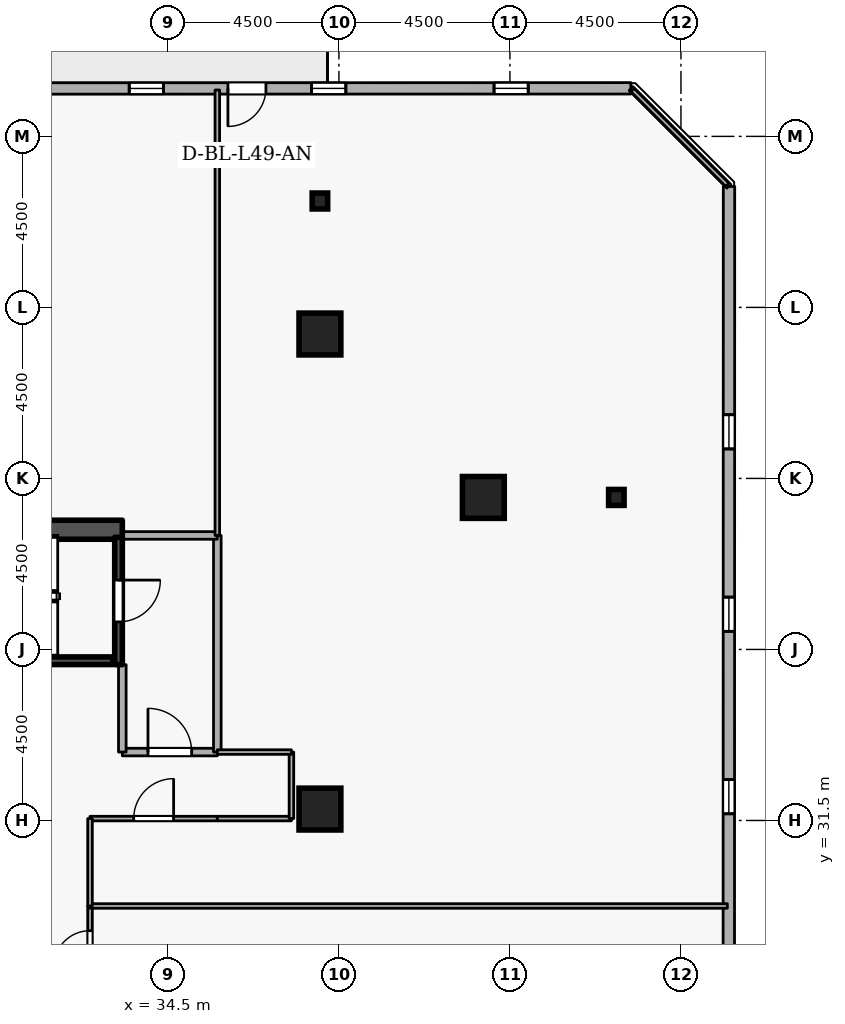
"""IFC4 building model, lengths in metres.
Left out: names, types, materials, properties, quantities, classifications, styles, units other than length and angle.
Written with IfcOpenShell. Run it as: python <this file> out.ifc"""

import sys

from ifc_helpers import new_model, si_unit, direction, frame, frame_2d, origin, origin_2d, place, context, subcontext, project, spatial, rectangle, i_section, extrude, element, fill, save


model = new_model("IFC4")
c1 = context("Model", 3, precision=1e-05, world=origin(), true_north=direction((0.0, 1.0)))
c2 = subcontext(c1, "Body", "Model", "MODEL_VIEW")
j1 = project(units=[si_unit("LENGTHUNIT", "METRE"), si_unit("PLANEANGLEUNIT", "RADIAN")], contexts=[c1])
p1 = place(None, origin())
s1 = spatial("IfcSite", under=j1, at=p1, CompositionType="ELEMENT")
p2 = place(p1, origin())
s2 = spatial("IfcBuilding", under=s1, at=p2, CompositionType="ELEMENT")
p3 = place(p2, frame((0.0, 0.0, 185.7)))
s3 = spatial("IfcBuildingStorey", under=s2, at=p3, CompositionType="ELEMENT", Elevation=185.7)
p4 = place(p3, frame((17.7, 39.15, 0.0), z_axis=(0.0, 0.0, 1.0), x_axis=(1.0, 0.0, 0.0)))
e1 = element("IfcWall", 1, at=p4, inside=s3, PredefinedType="SHEAR", context=c2, shape_type="SweptSolid", body=[
    extrude(rectangle(XDim=15.6, YDim=0.5, at=frame_2d((7.8, 0.0))), origin(), (0.0, 0.0, 1.0), 3.6),
])
for number, where, z_axis, x_axis in (
    (2, (42.8, 40.0, 0.0), (0.0, 0.0, 1.0), (1.0, 0.0, 0.0)),
    (3, (38.5, 44.3, 0.0), (0.0, 0.0, 1.0), (1.0, 0.0, 0.0)),
    (4, (38.5, 31.8, 0.0), (0.0, 0.0, 1.0), (1.0, 0.0, 0.0)),
):
    element("IfcColumn", number, at=place(p3, frame(where, z_axis=z_axis, x_axis=x_axis)), inside=s3, PredefinedType="COLUMN", context=c2, shape_type="SweptSolid", body=[
        extrude(rectangle(XDim=1.1, YDim=1.1, at=origin_2d()), origin(), (0.0, 0.0, 1.0), 3.6),
    ])
for number, where, z_axis, x_axis in (
    (5, (46.3, 40.0, 0.0), (0.0, 0.0, 1.0), (1.0, 0.0, 0.0)),
    (6, (38.5, 47.8, 0.0), (0.0, 0.0, 1.0), (1.0, 0.0, 0.0)),
):
    element("IfcColumn", number, at=place(p3, frame(where, z_axis=z_axis, x_axis=x_axis)), inside=s3, PredefinedType="COLUMN", context=c2, shape_type="SweptSolid", body=[
        extrude(i_section(OverallWidth=0.407, OverallDepth=0.419, WebThickness=0.031, FlangeThickness=0.049, FilletRadius=0.015, at=origin_2d()), origin(), (0.0, 0.0, 1.0), 3.6),
    ])
p5 = place(p3, frame((49.256, 14.576, 0.0), z_axis=(0.0, 0.0, 1.0), x_axis=(0.000268805477, 0.999999963872, 0.0)))
e7 = element("IfcWall", 7, at=p5, inside=s3, PredefinedType="STANDARD", context=c2, shape_type="SweptSolid", body=[
    extrude(rectangle(XDim=33.605, YDim=0.3, at=frame_2d((16.802, 0.0))), origin(), (0.0, 0.0, 1.0), 2.7),
])
p6 = place(p5, frame((2.7, 0.0, 0.72)))
e8 = element("IfcOpeningElement", 8, at=p6, cuts=e7, PredefinedType="OPENING", context=c2, shape_type="SweptSolid", body=[
    extrude(rectangle(XDim=0.9, YDim=1.75, at=frame_2d((0.45, 0.875))), frame((0.0, 0.16, 0.0), z_axis=(0.0, -1.0, 0.0), x_axis=(1.0, 0.0, 0.0)), (0.0, 0.0, 1.0), 0.32),
])
p7 = place(p5, frame((7.5, 0.0, 0.72)))
e9 = element("IfcOpeningElement", 9, at=p7, cuts=e7, PredefinedType="OPENING", context=c2, shape_type="SweptSolid", body=[
    extrude(rectangle(XDim=0.9, YDim=1.75, at=frame_2d((0.45, 0.875))), frame((0.0, 0.16, 0.0), z_axis=(0.0, -1.0, 0.0), x_axis=(1.0, 0.0, 0.0)), (0.0, 0.0, 1.0), 0.32),
])
p8 = place(p5, frame((17.1, 0.0, 0.72)))
e10 = element("IfcOpeningElement", 10, at=p8, cuts=e7, PredefinedType="OPENING", context=c2, shape_type="SweptSolid", body=[
    extrude(rectangle(XDim=0.9, YDim=1.75, at=frame_2d((0.45, 0.875))), frame((0.0, 0.16, 0.0), z_axis=(0.0, -1.0, 0.0), x_axis=(1.0, 0.0, 0.0)), (0.0, 0.0, 1.0), 0.32),
])
p9 = place(p5, frame((21.9, 0.0, 0.72)))
e11 = element("IfcOpeningElement", 11, at=p9, cuts=e7, PredefinedType="OPENING", context=c2, shape_type="SweptSolid", body=[
    extrude(rectangle(XDim=0.9, YDim=1.75, at=frame_2d((0.45, 0.875))), frame((0.0, 0.16, 0.0), z_axis=(0.0, -1.0, 0.0), x_axis=(1.0, 0.0, 0.0)), (0.0, 0.0, 1.0), 0.32),
])
p10 = place(p5, frame((26.7, 0.0, 0.72)))
e12 = element("IfcOpeningElement", 12, at=p10, cuts=e7, PredefinedType="OPENING", context=c2, shape_type="SweptSolid", body=[
    extrude(rectangle(XDim=0.9, YDim=1.75, at=frame_2d((0.45, 0.875))), frame((0.0, 0.16, 0.0), z_axis=(0.0, -1.0, 0.0), x_axis=(1.0, 0.0, 0.0)), (0.0, 0.0, 1.0), 0.32),
])
p11 = place(p3, frame((46.681, 50.765, 0.0), z_axis=(0.0, 0.0, 1.0), x_axis=(-0.999999963872, -0.000268805477, 0.0)))
e13 = element("IfcWall", 13, at=p11, inside=s3, PredefinedType="STANDARD", context=c2, shape_type="SweptSolid", body=[
    extrude(rectangle(XDim=33.605, YDim=0.3, at=frame_2d((16.802, 0.0))), origin(), (0.0, 0.0, 1.0), 2.7),
])
p12 = place(p11, frame((9.603, 0.0, 0.0)))
e14 = element("IfcOpeningElement", 14, at=p12, cuts=e13, PredefinedType="OPENING", context=c2, shape_type="SweptSolid", body=[
    extrude(rectangle(XDim=1.0, YDim=2.08, at=frame_2d((0.5, 1.04))), frame((0.0, 0.16, 0.0), z_axis=(0.0, -1.0, 0.0), x_axis=(1.0, 0.0, 0.0)), (0.0, 0.0, 1.0), 0.32),
])
p13 = place(p11, frame((2.7, 0.0, 0.72)))
e15 = element("IfcOpeningElement", 15, at=p13, cuts=e13, PredefinedType="OPENING", context=c2, shape_type="SweptSolid", body=[
    extrude(rectangle(XDim=0.9, YDim=1.75, at=frame_2d((0.45, 0.875))), frame((0.0, 0.16, 0.0), z_axis=(0.0, -1.0, 0.0), x_axis=(1.0, 0.0, 0.0)), (0.0, 0.0, 1.0), 0.32),
])
p14 = place(p11, frame((7.5, 0.0, 0.72)))
e16 = element("IfcOpeningElement", 16, at=p14, cuts=e13, PredefinedType="OPENING", context=c2, shape_type="SweptSolid", body=[
    extrude(rectangle(XDim=0.9, YDim=1.75, at=frame_2d((0.45, 0.875))), frame((0.0, 0.16, 0.0), z_axis=(0.0, -1.0, 0.0), x_axis=(1.0, 0.0, 0.0)), (0.0, 0.0, 1.0), 0.32),
])
p15 = place(p11, frame((12.3, 0.0, 0.72)))
e17 = element("IfcOpeningElement", 17, at=p15, cuts=e13, PredefinedType="OPENING", context=c2, shape_type="SweptSolid", body=[
    extrude(rectangle(XDim=0.9, YDim=1.75, at=frame_2d((0.45, 0.875))), frame((0.0, 0.16, 0.0), z_axis=(0.0, -1.0, 0.0), x_axis=(1.0, 0.0, 0.0)), (0.0, 0.0, 1.0), 0.32),
])
p16 = place(p11, frame((17.1, 0.0, 0.72)))
e18 = element("IfcOpeningElement", 18, at=p16, cuts=e13, PredefinedType="OPENING", context=c2, shape_type="SweptSolid", body=[
    extrude(rectangle(XDim=0.9, YDim=1.75, at=frame_2d((0.45, 0.875))), frame((0.0, 0.16, 0.0), z_axis=(0.0, -1.0, 0.0), x_axis=(1.0, 0.0, 0.0)), (0.0, 0.0, 1.0), 0.32),
])
p17 = place(p11, frame((21.9, 0.0, 0.72)))
e19 = element("IfcOpeningElement", 19, at=p17, cuts=e13, PredefinedType="OPENING", context=c2, shape_type="SweptSolid", body=[
    extrude(rectangle(XDim=0.9, YDim=1.75, at=frame_2d((0.45, 0.875))), frame((0.0, 0.16, 0.0), z_axis=(0.0, -1.0, 0.0), x_axis=(1.0, 0.0, 0.0)), (0.0, 0.0, 1.0), 0.32),
])
p18 = place(p11, frame((26.7, 0.0, 0.72)))
e20 = element("IfcOpeningElement", 20, at=p18, cuts=e13, PredefinedType="OPENING", context=c2, shape_type="SweptSolid", body=[
    extrude(rectangle(XDim=0.9, YDim=1.75, at=frame_2d((0.45, 0.875))), frame((0.0, 0.16, 0.0), z_axis=(0.0, -1.0, 0.0), x_axis=(1.0, 0.0, 0.0)), (0.0, 0.0, 1.0), 0.32),
])
p19 = place(p3, frame((33.2, 38.95, 0.0), z_axis=(0.0, 0.0, 1.0), x_axis=(0.0, -1.0, 0.0)))
e21 = element("IfcWall", 21, at=p19, inside=s3, PredefinedType="SHEAR", context=c2, shape_type="SweptSolid", body=[
    extrude(rectangle(XDim=3.35, YDim=0.2, at=frame_2d((1.675, 0.0))), origin(), (0.0, 0.0, 1.0), 3.6),
])
p20 = place(p19, frame((1.125, 0.0, 0.0)))
e22 = element("IfcOpeningElement", 22, at=p20, cuts=e21, PredefinedType="OPENING", context=c2, shape_type="SweptSolid", body=[
    extrude(rectangle(XDim=1.1, YDim=2.1, at=frame_2d((0.55, 1.05))), frame((0.0, 0.11, 0.0), z_axis=(0.0, -1.0, 0.0), x_axis=(1.0, 0.0, 0.0)), (0.0, 0.0, 1.0), 0.22),
])
p21 = place(p3, frame((25.95, 35.703, 0.0), z_axis=(0.0, 0.0, 1.0), x_axis=(1.0, 0.0, 0.0)))
e23 = element("IfcWall", 23, at=p21, inside=s3, PredefinedType="SHEAR", context=c2, shape_type="SweptSolid", body=[
    extrude(rectangle(XDim=7.1, YDim=0.2, at=frame_2d((3.55, 0.0))), origin(), (0.0, 0.0, 1.0), 3.6),
])
p22 = place(p3, frame((33.3, 33.3, 0.0), z_axis=(0.0, 0.0, 1.0), x_axis=(1.0, 0.0, 0.0)))
e24 = element("IfcWall", 24, at=p22, inside=s3, PredefinedType="STANDARD", context=c2, shape_type="SweptSolid", body=[
    extrude(rectangle(XDim=2.5, YDim=0.2, at=frame_2d((1.25, 0.0))), origin(), (0.0, 0.0, 1.0), 3.34),
])
p23 = place(p22, frame((0.675, 0.0, 0.0)))
e25 = element("IfcOpeningElement", 25, at=p23, cuts=e24, PredefinedType="OPENING", context=c2, shape_type="SweptSolid", body=[
    extrude(rectangle(XDim=1.15, YDim=2.1, at=frame_2d((0.575, 1.05))), frame((0.0, 0.11, 0.0), z_axis=(0.0, -1.0, 0.0), x_axis=(1.0, 0.0, 0.0)), (0.0, 0.0, 1.0), 0.22),
])
p24 = place(p3, frame((35.8, 33.3, 0.0), z_axis=(0.0, 0.0, 1.0), x_axis=(0.0, 1.0, 0.0)))
e26 = element("IfcWall", 26, at=p24, inside=s3, PredefinedType="STANDARD", context=c2, shape_type="SweptSolid", body=[
    extrude(rectangle(XDim=5.7, YDim=0.2, at=frame_2d((2.85, 0.0))), origin(), (0.0, 0.0, 1.0), 3.34),
])
p25 = place(p3, frame((35.8, 39.0, 0.0), z_axis=(0.0, 0.0, 1.0), x_axis=(-1.0, 0.0, 0.0)))
e27 = element("IfcWall", 27, at=p25, inside=s3, PredefinedType="STANDARD", context=c2, shape_type="SweptSolid", body=[
    extrude(rectangle(XDim=2.5, YDim=0.2, at=frame_2d((1.25, 0.0))), origin(), (0.0, 0.0, 1.0), 3.34),
])
p26 = place(p3, frame((33.3, 35.6, 0.0), z_axis=(0.0, 0.0, 1.0), x_axis=(0.0, -1.0, 0.0)))
e28 = element("IfcWall", 28, at=p26, inside=s3, PredefinedType="STANDARD", context=c2, shape_type="SweptSolid", body=[
    extrude(rectangle(XDim=2.3, YDim=0.2, at=frame_2d((1.15, 0.0))), origin(), (0.0, 0.0, 1.0), 2.545),
])
p27 = place(p3, frame((32.45, 27.0, 0.0), z_axis=(0.0, 0.0, 1.0), x_axis=(0.0, 1.0, 0.0)))
e29 = element("IfcWall", 29, at=p27, inside=s3, PredefinedType="PARTITIONING", context=c2, shape_type="SweptSolid", body=[
    extrude(rectangle(XDim=2.25, YDim=0.12, at=frame_2d((1.125, 0.0))), origin(), (0.0, 0.0, 1.0), 3.34),
])
p28 = place(p27, frame((0.65, 0.0, 0.0)))
e30 = element("IfcOpeningElement", 30, at=p28, cuts=e29, PredefinedType="OPENING", context=c2, shape_type="SweptSolid", body=[
    extrude(rectangle(XDim=0.95, YDim=2.1, at=frame_2d((0.475, 1.05))), frame((0.0, 0.07, 0.0), z_axis=(0.0, -1.0, 0.0), x_axis=(1.0, 0.0, 0.0)), (0.0, 0.0, 1.0), 0.14),
])
p29 = place(p3, frame((32.45, 29.25, 0.0), z_axis=(0.0, 0.0, 1.0), x_axis=(1.0, 0.0, 0.0)))
e31 = element("IfcWall", 31, at=p29, inside=s3, PredefinedType="PARTITIONING", context=c2, shape_type="SweptSolid", body=[
    extrude(rectangle(XDim=16.77, YDim=0.12, at=frame_2d((8.385, 0.0))), origin(), (0.0, 0.0, 1.0), 3.34),
])
p30 = place(p3, frame((32.45, 31.55, 0.0), z_axis=(0.0, 0.0, 1.0), x_axis=(1.0, 0.0, 0.0)))
e32 = element("IfcWall", 32, at=p30, inside=s3, PredefinedType="PARTITIONING", context=c2, shape_type="SweptSolid", body=[
    extrude(rectangle(XDim=3.35, YDim=0.12, at=frame_2d((1.675, 0.0))), origin(), (0.0, 0.0, 1.0), 3.34),
])
p31 = place(p30, frame((1.15, 0.0, 0.0)))
e33 = element("IfcOpeningElement", 33, at=p31, cuts=e32, PredefinedType="OPENING", context=c2, shape_type="SweptSolid", body=[
    extrude(rectangle(XDim=1.05, YDim=2.1, at=frame_2d((0.525, 1.05))), frame((0.0, 0.07, 0.0), z_axis=(0.0, -1.0, 0.0), x_axis=(1.0, 0.0, 0.0)), (0.0, 0.0, 1.0), 0.14),
])
p32 = place(p3, frame((35.8, 31.55, 0.0), z_axis=(0.0, 0.0, 1.0), x_axis=(1.0, 0.0, 0.0)))
e34 = element("IfcWall", 34, at=p32, inside=s3, PredefinedType="PARTITIONING", context=c2, shape_type="SweptSolid", body=[
    extrude(rectangle(XDim=1.95, YDim=0.12, at=frame_2d((0.975, 0.0))), origin(), (0.0, 0.0, 1.0), 3.34),
])
p33 = place(p3, frame((37.75, 31.55, 0.0), z_axis=(0.0, 0.0, 1.0), x_axis=(0.0, 1.0, 0.0)))
e35 = element("IfcWall", 35, at=p33, inside=s3, PredefinedType="PARTITIONING", context=c2, shape_type="SweptSolid", body=[
    extrude(rectangle(XDim=1.75, YDim=0.12, at=frame_2d((0.875, 0.0))), origin(), (0.0, 0.0, 1.0), 3.34),
])
p34 = place(p3, frame((37.75, 33.3, 0.0), z_axis=(0.0, 0.0, 1.0), x_axis=(-1.0, 0.0, 0.0)))
e36 = element("IfcWall", 36, at=p34, inside=s3, PredefinedType="PARTITIONING", context=c2, shape_type="SweptSolid", body=[
    extrude(rectangle(XDim=1.95, YDim=0.12, at=frame_2d((0.975, 0.0))), origin(), (0.0, 0.0, 1.0), 3.34),
])
p35 = place(p3, frame((35.8, 39.0, 0.0), z_axis=(0.0, 0.0, 1.0), x_axis=(0.0, 1.0, 0.0)))
e37 = element("IfcWall", 37, at=p35, inside=s3, PredefinedType="PARTITIONING", context=c2, shape_type="SweptSolid", body=[
    extrude(rectangle(XDim=11.72, YDim=0.12, at=frame_2d((5.86, 0.0))), origin(), (0.0, 0.0, 1.0), 3.34),
])
p36 = place(p3, frame((46.725, 50.72, 0.0), z_axis=(0.0, 0.0, 1.0), x_axis=(0.707106781187, -0.707106781187, 0.0)))
e38 = element("IfcWall", 38, at=p36, inside=s3, PredefinedType="PARTITIONING", context=c2, shape_type="SweptSolid", body=[
    extrude(rectangle(XDim=3.528, YDim=0.12, at=frame_2d((1.764, 0.0))), origin(), (0.0, 0.0, 1.0), 3.34),
])
p37 = place(p3, frame((32.45, 29.25, 0.0), z_axis=(0.0, 0.0, 1.0), x_axis=(0.0, 1.0, 0.0)))
e39 = element("IfcWall", 39, at=p37, inside=s3, PredefinedType="PARTITIONING", context=c2, shape_type="SweptSolid", body=[
    extrude(rectangle(XDim=2.3, YDim=0.12, at=frame_2d((1.15, 0.0))), origin(), (0.0, 0.0, 1.0), 3.34),
])
p38 = place(p8, origin())
e40 = element("IfcWindow", 40, at=p38, inside=s3, PartitioningType="SINGLE_PANEL", PredefinedType="WINDOW", context=c2, shape_type="SweptSolid", body=[
    extrude(rectangle(XDim=0.9, YDim=1.75, at=frame_2d((0.45, 0.875))), frame((0.0, 0.03, 0.0), z_axis=(0.0, -1.0, 0.0), x_axis=(1.0, 0.0, 0.0)), (0.0, 0.0, 1.0), 0.06),
])
fill(e10, e40)
p39 = place(p9, origin())
e41 = element("IfcWindow", 41, at=p39, inside=s3, PartitioningType="SINGLE_PANEL", PredefinedType="WINDOW", context=c2, shape_type="SweptSolid", body=[
    extrude(rectangle(XDim=0.9, YDim=1.75, at=frame_2d((0.45, 0.875))), frame((0.0, 0.03, 0.0), z_axis=(0.0, -1.0, 0.0), x_axis=(1.0, 0.0, 0.0)), (0.0, 0.0, 1.0), 0.06),
])
fill(e11, e41)
p40 = place(p10, origin())
e42 = element("IfcWindow", 42, at=p40, inside=s3, PartitioningType="SINGLE_PANEL", PredefinedType="WINDOW", context=c2, shape_type="SweptSolid", body=[
    extrude(rectangle(XDim=0.9, YDim=1.75, at=frame_2d((0.45, 0.875))), frame((0.0, 0.03, 0.0), z_axis=(0.0, -1.0, 0.0), x_axis=(1.0, 0.0, 0.0)), (0.0, 0.0, 1.0), 0.06),
])
fill(e12, e42)
p41 = place(p12, origin())
e43 = element("IfcDoor", 43, at=p41, inside=s3, OperationType="SINGLE_SWING_RIGHT", PredefinedType="DOOR", context=c2, shape_type="SweptSolid", body=[
    extrude(rectangle(XDim=1.0, YDim=2.08, at=frame_2d((0.5, 1.04))), frame((0.0, 0.025, 0.0), z_axis=(0.0, -1.0, 0.0), x_axis=(1.0, 0.0, 0.0)), (0.0, 0.0, 1.0), 0.05),
])
fill(e14, e43)
p42 = place(p13, origin())
e44 = element("IfcWindow", 44, at=p42, inside=s3, PartitioningType="SINGLE_PANEL", PredefinedType="WINDOW", context=c2, shape_type="SweptSolid", body=[
    extrude(rectangle(XDim=0.9, YDim=1.75, at=frame_2d((0.45, 0.875))), frame((0.0, 0.03, 0.0), z_axis=(0.0, -1.0, 0.0), x_axis=(1.0, 0.0, 0.0)), (0.0, 0.0, 1.0), 0.06),
])
fill(e15, e44)
p43 = place(p14, origin())
e45 = element("IfcWindow", 45, at=p43, inside=s3, PartitioningType="SINGLE_PANEL", PredefinedType="WINDOW", context=c2, shape_type="SweptSolid", body=[
    extrude(rectangle(XDim=0.9, YDim=1.75, at=frame_2d((0.45, 0.875))), frame((0.0, 0.03, 0.0), z_axis=(0.0, -1.0, 0.0), x_axis=(1.0, 0.0, 0.0)), (0.0, 0.0, 1.0), 0.06),
])
fill(e16, e45)
p44 = place(p15, origin())
e46 = element("IfcWindow", 46, at=p44, inside=s3, PartitioningType="SINGLE_PANEL", PredefinedType="WINDOW", context=c2, shape_type="SweptSolid", body=[
    extrude(rectangle(XDim=0.9, YDim=1.75, at=frame_2d((0.45, 0.875))), frame((0.0, 0.03, 0.0), z_axis=(0.0, -1.0, 0.0), x_axis=(1.0, 0.0, 0.0)), (0.0, 0.0, 1.0), 0.06),
])
fill(e17, e46)
p45 = place(p20, origin())
e47 = element("IfcDoor", 47, at=p45, inside=s3, OperationType="SINGLE_SWING_LEFT", PredefinedType="DOOR", context=c2, shape_type="SweptSolid", body=[
    extrude(rectangle(XDim=1.1, YDim=2.1, at=frame_2d((0.55, 1.05))), frame((0.0, 0.025, 0.0), z_axis=(0.0, -1.0, 0.0), x_axis=(1.0, 0.0, 0.0)), (0.0, 0.0, 1.0), 0.05),
])
fill(e22, e47)
p46 = place(p23, origin())
e48 = element("IfcDoor", 48, at=p46, inside=s3, OperationType="SINGLE_SWING_LEFT", PredefinedType="DOOR", context=c2, shape_type="SweptSolid", body=[
    extrude(rectangle(XDim=1.15, YDim=2.1, at=frame_2d((0.575, 1.05))), frame((0.0, 0.025, 0.0), z_axis=(0.0, -1.0, 0.0), x_axis=(1.0, 0.0, 0.0)), (0.0, 0.0, 1.0), 0.05),
])
fill(e25, e48)
p47 = place(p28, origin())
e49 = element("IfcDoor", 49, at=p47, inside=s3, OperationType="SINGLE_SWING_LEFT", PredefinedType="DOOR", context=c2, shape_type="SweptSolid", body=[
    extrude(rectangle(XDim=0.95, YDim=2.1, at=frame_2d((0.475, 1.05))), frame((0.0, 0.025, 0.0), z_axis=(0.0, -1.0, 0.0), x_axis=(1.0, 0.0, 0.0)), (0.0, 0.0, 1.0), 0.05),
])
fill(e30, e49)
p48 = place(p31, origin())
e50 = element("IfcDoor", 50, at=p48, inside=s3, OperationType="SINGLE_SWING_RIGHT", PredefinedType="DOOR", context=c2, shape_type="SweptSolid", body=[
    extrude(rectangle(XDim=1.05, YDim=2.1, at=frame_2d((0.525, 1.05))), frame((0.0, 0.025, 0.0), z_axis=(0.0, -1.0, 0.0), x_axis=(1.0, 0.0, 0.0)), (0.0, 0.0, 1.0), 0.05),
])
fill(e33, e50)
save(model, sys.argv[1])
